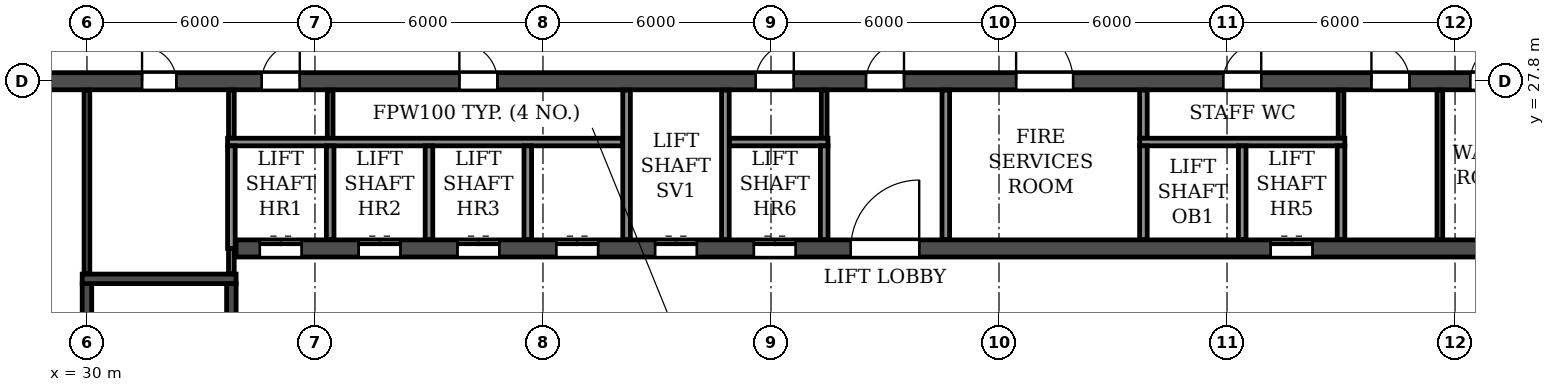
"""IFC4 building model, lengths in metres.
Left out: names, types, materials, properties, quantities, classifications, styles, units other than length and angle.
Written with IfcOpenShell. Run it as: python <this file> out.ifc"""

import sys

from ifc_helpers import new_model, si_unit, direction, frame, frame_2d, origin, place, context, subcontext, project, spatial, rectangle, extrude, element, fill, save


model = new_model("IFC4")
c1 = context("Model", 3, precision=1e-05, world=origin(), true_north=direction((0.0, 1.0)))
c2 = subcontext(c1, "Body", "Model", "MODEL_VIEW")
j1 = project(units=[si_unit("LENGTHUNIT", "METRE"), si_unit("PLANEANGLEUNIT", "RADIAN")], contexts=[c1])
p1 = place(None, origin())
s1 = spatial("IfcSite", under=j1, at=p1, CompositionType="ELEMENT")
p2 = place(p1, origin())
s2 = spatial("IfcBuilding", under=s1, at=p2, CompositionType="ELEMENT")
p3 = place(p2, frame((0.0, 0.0, 152.1)))
s3 = spatial("IfcBuildingStorey", under=s2, at=p3, CompositionType="ELEMENT", Elevation=152.1)
p4 = place(p3, frame((12.2, 27.8, 0.0), z_axis=(0.0, 0.0, 1.0), x_axis=(1.0, 0.0, 0.0)))
e1 = element("IfcWall", 1, at=p4, inside=s3, PredefinedType="SOLIDWALL", context=c2, shape_type="SweptSolid", body=[
    extrude(rectangle(XDim=77.6, YDim=0.45, at=frame_2d((38.8, 0.0))), origin(), (0.0, 0.0, 1.0), 3.07),
])
p5 = place(p4, frame((2.3, 0.0, 0.0)))
e2 = element("IfcOpeningElement", 2, at=p5, cuts=e1, PredefinedType="OPENING", context=c2, shape_type="SweptSolid", body=[
    extrude(rectangle(XDim=1.0, YDim=2.1, at=frame_2d((0.5, 1.05))), frame((0.0, 0.235, 0.0), z_axis=(0.0, -1.0, 0.0), x_axis=(1.0, 0.0, 0.0)), (0.0, 0.0, 1.0), 0.47),
])
p6 = place(p4, frame((6.7, 0.0, 0.0)))
e3 = element("IfcOpeningElement", 3, at=p6, cuts=e1, PredefinedType="OPENING", context=c2, shape_type="SweptSolid", body=[
    extrude(rectangle(XDim=1.0, YDim=2.1, at=frame_2d((0.5, 1.05))), frame((0.0, 0.235, 0.0), z_axis=(0.0, -1.0, 0.0), x_axis=(1.0, 0.0, 0.0)), (0.0, 0.0, 1.0), 0.47),
])
p7 = place(p4, frame((10.05, 0.0, 0.0)))
e4 = element("IfcOpeningElement", 4, at=p7, cuts=e1, PredefinedType="OPENING", context=c2, shape_type="SweptSolid", body=[
    extrude(rectangle(XDim=0.9, YDim=2.1, at=frame_2d((0.45, 1.05))), frame((0.0, 0.235, 0.0), z_axis=(0.0, -1.0, 0.0), x_axis=(1.0, 0.0, 0.0)), (0.0, 0.0, 1.0), 0.47),
])
p8 = place(p4, frame((19.25, 0.0, 0.0)))
e5 = element("IfcOpeningElement", 5, at=p8, cuts=e1, PredefinedType="OPENING", context=c2, shape_type="SweptSolid", body=[
    extrude(rectangle(XDim=0.9, YDim=2.1, at=frame_2d((0.45, 1.05))), frame((0.0, 0.235, 0.0), z_axis=(0.0, -1.0, 0.0), x_axis=(1.0, 0.0, 0.0)), (0.0, 0.0, 1.0), 0.47),
])
p9 = place(p4, frame((22.4, 0.0, 0.0)))
e6 = element("IfcOpeningElement", 6, at=p9, cuts=e1, PredefinedType="OPENING", context=c2, shape_type="SweptSolid", body=[
    extrude(rectangle(XDim=1.0, YDim=2.1, at=frame_2d((0.5, 1.05))), frame((0.0, 0.235, 0.0), z_axis=(0.0, -1.0, 0.0), x_axis=(1.0, 0.0, 0.0)), (0.0, 0.0, 1.0), 0.47),
])
p10 = place(p4, frame((27.6, 0.0, 0.0)))
e7 = element("IfcOpeningElement", 7, at=p10, cuts=e1, PredefinedType="OPENING", context=c2, shape_type="SweptSolid", body=[
    extrude(rectangle(XDim=1.0, YDim=2.1, at=frame_2d((0.5, 1.05))), frame((0.0, 0.235, 0.0), z_axis=(0.0, -1.0, 0.0), x_axis=(1.0, 0.0, 0.0)), (0.0, 0.0, 1.0), 0.47),
])
p11 = place(p4, frame((35.4, 0.0, 0.0)))
e8 = element("IfcOpeningElement", 8, at=p11, cuts=e1, PredefinedType="OPENING", context=c2, shape_type="SweptSolid", body=[
    extrude(rectangle(XDim=1.0, YDim=2.1, at=frame_2d((0.5, 1.05))), frame((0.0, 0.235, 0.0), z_axis=(0.0, -1.0, 0.0), x_axis=(1.0, 0.0, 0.0)), (0.0, 0.0, 1.0), 0.47),
])
p12 = place(p4, frame((38.3, 0.0, 0.0)))
e9 = element("IfcOpeningElement", 9, at=p12, cuts=e1, PredefinedType="OPENING", context=c2, shape_type="SweptSolid", body=[
    extrude(rectangle(XDim=1.0, YDim=2.1, at=frame_2d((0.5, 1.05))), frame((0.0, 0.235, 0.0), z_axis=(0.0, -1.0, 0.0), x_axis=(1.0, 0.0, 0.0)), (0.0, 0.0, 1.0), 0.47),
])
p13 = place(p4, frame((42.25, 0.0, 0.0)))
e10 = element("IfcOpeningElement", 10, at=p13, cuts=e1, PredefinedType="OPENING", context=c2, shape_type="SweptSolid", body=[
    extrude(rectangle(XDim=1.5, YDim=2.1, at=frame_2d((0.75, 1.05))), frame((0.0, 0.235, 0.0), z_axis=(0.0, -1.0, 0.0), x_axis=(1.0, 0.0, 0.0)), (0.0, 0.0, 1.0), 0.47),
])
p14 = place(p4, frame((47.7, 0.0, 0.0)))
e11 = element("IfcOpeningElement", 11, at=p14, cuts=e1, PredefinedType="OPENING", context=c2, shape_type="SweptSolid", body=[
    extrude(rectangle(XDim=1.0, YDim=2.1, at=frame_2d((0.5, 1.05))), frame((0.0, 0.235, 0.0), z_axis=(0.0, -1.0, 0.0), x_axis=(1.0, 0.0, 0.0)), (0.0, 0.0, 1.0), 0.47),
])
p15 = place(p4, frame((51.6, 0.0, 0.0)))
e12 = element("IfcOpeningElement", 12, at=p15, cuts=e1, PredefinedType="OPENING", context=c2, shape_type="SweptSolid", body=[
    extrude(rectangle(XDim=1.0, YDim=2.1, at=frame_2d((0.5, 1.05))), frame((0.0, 0.235, 0.0), z_axis=(0.0, -1.0, 0.0), x_axis=(1.0, 0.0, 0.0)), (0.0, 0.0, 1.0), 0.47),
])
p16 = place(p4, frame((54.2, 0.0, 0.0)))
e13 = element("IfcOpeningElement", 13, at=p16, cuts=e1, PredefinedType="OPENING", context=c2, shape_type="SweptSolid", body=[
    extrude(rectangle(XDim=1.0, YDim=2.1, at=frame_2d((0.5, 1.05))), frame((0.0, 0.235, 0.0), z_axis=(0.0, -1.0, 0.0), x_axis=(1.0, 0.0, 0.0)), (0.0, 0.0, 1.0), 0.47),
])
p17 = place(p4, frame((57.45, 0.0, 0.0)))
e14 = element("IfcOpeningElement", 14, at=p17, cuts=e1, PredefinedType="OPENING", context=c2, shape_type="SweptSolid", body=[
    extrude(rectangle(XDim=0.9, YDim=2.1, at=frame_2d((0.45, 1.05))), frame((0.0, 0.235, 0.0), z_axis=(0.0, -1.0, 0.0), x_axis=(1.0, 0.0, 0.0)), (0.0, 0.0, 1.0), 0.47),
])
p18 = place(p4, frame((66.65, 0.0, 0.0)))
e15 = element("IfcOpeningElement", 15, at=p18, cuts=e1, PredefinedType="OPENING", context=c2, shape_type="SweptSolid", body=[
    extrude(rectangle(XDim=0.9, YDim=2.1, at=frame_2d((0.45, 1.05))), frame((0.0, 0.235, 0.0), z_axis=(0.0, -1.0, 0.0), x_axis=(1.0, 0.0, 0.0)), (0.0, 0.0, 1.0), 0.47),
])
p19 = place(p4, frame((69.9, 0.0, 0.0)))
e16 = element("IfcOpeningElement", 16, at=p19, cuts=e1, PredefinedType="OPENING", context=c2, shape_type="SweptSolid", body=[
    extrude(rectangle(XDim=1.0, YDim=2.1, at=frame_2d((0.5, 1.05))), frame((0.0, 0.235, 0.0), z_axis=(0.0, -1.0, 0.0), x_axis=(1.0, 0.0, 0.0)), (0.0, 0.0, 1.0), 0.47),
])
p20 = place(p4, frame((74.3, 0.0, 0.0)))
e17 = element("IfcOpeningElement", 17, at=p20, cuts=e1, PredefinedType="OPENING", context=c2, shape_type="SweptSolid", body=[
    extrude(rectangle(XDim=1.0, YDim=2.1, at=frame_2d((0.5, 1.05))), frame((0.0, 0.235, 0.0), z_axis=(0.0, -1.0, 0.0), x_axis=(1.0, 0.0, 0.0)), (0.0, 0.0, 1.0), 0.47),
])
p21 = place(p3, frame((33.925, 23.4, 0.0), z_axis=(0.0, 0.0, 1.0), x_axis=(1.0, 0.0, 0.0)))
e18 = element("IfcWall", 18, at=p21, inside=s3, PredefinedType="SOLIDWALL", context=c2, shape_type="SweptSolid", body=[
    extrude(rectangle(XDim=34.15, YDim=0.45, at=frame_2d((17.075, 0.0))), origin(), (0.0, 0.0, 1.0), 3.07),
])
p22 = place(p21, frame((16.175, 0.0, 0.0)))
e19 = element("IfcOpeningElement", 19, at=p22, cuts=e18, PredefinedType="OPENING", context=c2, shape_type="SweptSolid", body=[
    extrude(rectangle(XDim=1.8, YDim=2.1, at=frame_2d((0.9, 1.05))), frame((0.0, 0.235, 0.0), z_axis=(0.0, -1.0, 0.0), x_axis=(1.0, 0.0, 0.0)), (0.0, 0.0, 1.0), 0.47),
])
p23 = place(p21, frame((0.625, 0.0, 0.0)))
e20 = element("IfcOpeningElement", 20, at=p23, cuts=e18, PredefinedType="OPENING", context=c2, shape_type="SweptSolid", body=[
    extrude(rectangle(XDim=1.1, YDim=2.1, at=frame_2d((0.55, 1.05))), frame((0.0, 0.235, 0.0), z_axis=(0.0, -1.0, 0.0), x_axis=(1.0, 0.0, 0.0)), (0.0, 0.0, 1.0), 0.47),
])
p24 = place(p21, frame((3.225, 0.0, 0.0)))
e21 = element("IfcOpeningElement", 21, at=p24, cuts=e18, PredefinedType="OPENING", context=c2, shape_type="SweptSolid", body=[
    extrude(rectangle(XDim=1.1, YDim=2.1, at=frame_2d((0.55, 1.05))), frame((0.0, 0.235, 0.0), z_axis=(0.0, -1.0, 0.0), x_axis=(1.0, 0.0, 0.0)), (0.0, 0.0, 1.0), 0.47),
])
p25 = place(p21, frame((5.825, 0.0, 0.0)))
e22 = element("IfcOpeningElement", 22, at=p25, cuts=e18, PredefinedType="OPENING", context=c2, shape_type="SweptSolid", body=[
    extrude(rectangle(XDim=1.1, YDim=2.1, at=frame_2d((0.55, 1.05))), frame((0.0, 0.235, 0.0), z_axis=(0.0, -1.0, 0.0), x_axis=(1.0, 0.0, 0.0)), (0.0, 0.0, 1.0), 0.47),
])
p26 = place(p21, frame((8.425, 0.0, 0.0)))
e23 = element("IfcOpeningElement", 23, at=p26, cuts=e18, PredefinedType="OPENING", context=c2, shape_type="SweptSolid", body=[
    extrude(rectangle(XDim=1.1, YDim=2.1, at=frame_2d((0.55, 1.05))), frame((0.0, 0.235, 0.0), z_axis=(0.0, -1.0, 0.0), x_axis=(1.0, 0.0, 0.0)), (0.0, 0.0, 1.0), 0.47),
])
p27 = place(p21, frame((11.025, 0.0, 0.0)))
e24 = element("IfcOpeningElement", 24, at=p27, cuts=e18, PredefinedType="OPENING", context=c2, shape_type="SweptSolid", body=[
    extrude(rectangle(XDim=1.1, YDim=2.1, at=frame_2d((0.55, 1.05))), frame((0.0, 0.235, 0.0), z_axis=(0.0, -1.0, 0.0), x_axis=(1.0, 0.0, 0.0)), (0.0, 0.0, 1.0), 0.47),
])
p28 = place(p21, frame((13.625, 0.0, 0.0)))
e25 = element("IfcOpeningElement", 25, at=p28, cuts=e18, PredefinedType="OPENING", context=c2, shape_type="SweptSolid", body=[
    extrude(rectangle(XDim=1.1, YDim=2.1, at=frame_2d((0.55, 1.05))), frame((0.0, 0.235, 0.0), z_axis=(0.0, -1.0, 0.0), x_axis=(1.0, 0.0, 0.0)), (0.0, 0.0, 1.0), 0.47),
])
p29 = place(p21, frame((27.225, 0.0, 0.0)))
e26 = element("IfcOpeningElement", 26, at=p29, cuts=e18, PredefinedType="OPENING", context=c2, shape_type="SweptSolid", body=[
    extrude(rectangle(XDim=1.1, YDim=2.1, at=frame_2d((0.55, 1.05))), frame((0.0, 0.235, 0.0), z_axis=(0.0, -1.0, 0.0), x_axis=(1.0, 0.0, 0.0)), (0.0, 0.0, 1.0), 0.47),
])
p30 = place(p3, frame((30.0, 14.825, 0.0), z_axis=(0.0, 0.0, 1.0), x_axis=(0.0, 1.0, 0.0)))
e27 = element("IfcWall", 27, at=p30, inside=s3, PredefinedType="SOLIDWALL", context=c2, shape_type="SweptSolid", body=[
    extrude(rectangle(XDim=7.65, YDim=0.25, at=frame_2d((3.825, 0.0))), origin(), (0.0, 0.0, 1.0), 3.07),
])
p31 = place(p3, frame((33.8, 14.825, 0.0), z_axis=(0.0, 0.0, 1.0), x_axis=(0.0, 1.0, 0.0)))
e28 = element("IfcWall", 28, at=p31, inside=s3, PredefinedType="SOLIDWALL", context=c2, shape_type="SweptSolid", body=[
    extrude(rectangle(XDim=7.65, YDim=0.25, at=frame_2d((3.825, 0.0))), origin(), (0.0, 0.0, 1.0), 3.07),
])
p32 = place(p31, frame((0.475, 0.0, 0.0)))
e29 = element("IfcOpeningElement", 29, at=p32, cuts=e28, PredefinedType="OPENING", context=c2, shape_type="SweptSolid", body=[
    extrude(rectangle(XDim=1.0, YDim=2.1, at=frame_2d((0.5, 1.05))), frame((0.0, 0.135, 0.0), z_axis=(0.0, -1.0, 0.0), x_axis=(1.0, 0.0, 0.0)), (0.0, 0.0, 1.0), 0.27),
])
p33 = place(p3, frame((29.875, 22.6, 0.0), z_axis=(0.0, 0.0, 1.0), x_axis=(1.0, 0.0, 0.0)))
e30 = element("IfcWall", 30, at=p33, inside=s3, PredefinedType="SOLIDWALL", context=c2, shape_type="SweptSolid", body=[
    extrude(rectangle(XDim=4.05, YDim=0.25, at=frame_2d((2.025, 0.0))), origin(), (0.0, 0.0, 1.0), 3.07),
])
for number, where, z_axis, x_axis in (
    (31, (49.4, 26.3, 0.0), (0.0, 0.0, 1.0), (0.0, 1.0, 0.0)),
    (32, (36.4, 26.3, 0.0), (0.0, 0.0, 1.0), (0.0, 1.0, 0.0)),
    (33, (63.0, 26.3, 0.0), (0.0, 0.0, 1.0), (0.0, 1.0, 0.0)),
):
    element("IfcWall", number, at=place(p3, frame(where, z_axis=z_axis, x_axis=x_axis)), inside=s3, PredefinedType="PARTITIONING", context=c2, shape_type="SweptSolid", body=[
        extrude(rectangle(XDim=1.265, YDim=0.15, at=frame_2d((0.632, 0.0))), origin(), (0.0, 0.0, 1.0), 3.07),
    ])
p34 = place(p3, frame((65.6, 23.635, 0.0), z_axis=(0.0, 0.0, 1.0), x_axis=(0.0, 1.0, 0.0)))
e34 = element("IfcWall", 34, at=p34, inside=s3, PredefinedType="PARTITIONING", context=c2, shape_type="SweptSolid", body=[
    extrude(rectangle(XDim=3.93, YDim=0.15, at=frame_2d((1.965, 0.0))), origin(), (0.0, 0.0, 1.0), 3.07),
])
p35 = place(p3, frame((52.6, 23.635, 0.0), z_axis=(0.0, 0.0, 1.0), x_axis=(0.0, 1.0, 0.0)))
e35 = element("IfcWall", 35, at=p35, inside=s3, PredefinedType="PARTITIONING", context=c2, shape_type="SweptSolid", body=[
    extrude(rectangle(XDim=3.93, YDim=0.2, at=frame_2d((1.965, 0.0))), origin(), (0.0, 0.0, 1.0), 3.07),
])
p36 = place(p3, frame((57.8, 26.3, 0.0), z_axis=(0.0, 0.0, 1.0), x_axis=(0.0, 1.0, 0.0)))
e36 = element("IfcWall", 36, at=p36, inside=s3, PredefinedType="PARTITIONING", context=c2, shape_type="SweptSolid", body=[
    extrude(rectangle(XDim=1.265, YDim=0.2, at=frame_2d((0.632, 0.0))), origin(), (0.0, 0.0, 1.0), 3.07),
])
p37 = place(p3, frame((30.0, 22.735, 0.0), z_axis=(0.0, 0.0, 1.0), x_axis=(0.0, 1.0, 0.0)))
e37 = element("IfcWall", 37, at=p37, inside=s3, PredefinedType="PARTITIONING", context=c2, shape_type="SweptSolid", body=[
    extrude(rectangle(XDim=4.83, YDim=0.15, at=frame_2d((2.415, 0.0))), origin(), (0.0, 0.0, 1.0), 3.07),
])
p38 = place(p3, frame((33.8, 22.735, 0.0), z_axis=(0.0, 0.0, 1.0), x_axis=(0.0, 1.0, 0.0)))
e38 = element("IfcWall", 38, at=p38, inside=s3, PredefinedType="PARTITIONING", context=c2, shape_type="SweptSolid", body=[
    extrude(rectangle(XDim=0.665, YDim=0.15, at=frame_2d((0.333, 0.0))), origin(), (0.0, 0.0, 1.0), 3.07),
])
p39 = place(p3, frame((33.8, 26.3, 0.0), z_axis=(0.0, 0.0, 1.0), x_axis=(0.0, 1.0, 0.0)))
e39 = element("IfcWall", 39, at=p39, inside=s3, PredefinedType="PARTITIONING", context=c2, shape_type="SweptSolid", body=[
    extrude(rectangle(XDim=1.265, YDim=0.15, at=frame_2d((0.632, 0.0))), origin(), (0.0, 0.0, 1.0), 3.07),
])
p40 = place(p3, frame((33.7, 26.2, 0.0), z_axis=(0.0, 0.0, 1.0), x_axis=(1.0, 0.0, 0.0)))
e40 = element("IfcWall", 40, at=p40, inside=s3, PredefinedType="PARTITIONING", context=c2, shape_type="SweptSolid", body=[
    extrude(rectangle(XDim=10.4, YDim=0.2, at=frame_2d((5.2, 0.0))), origin(), (0.0, 0.0, 1.0), 3.07),
])
p41 = place(p3, frame((46.9, 26.2, 0.0), z_axis=(0.0, 0.0, 1.0), x_axis=(1.0, 0.0, 0.0)))
e41 = element("IfcWall", 41, at=p41, inside=s3, PredefinedType="PARTITIONING", context=c2, shape_type="SweptSolid", body=[
    extrude(rectangle(XDim=2.6, YDim=0.2, at=frame_2d((1.3, 0.0))), origin(), (0.0, 0.0, 1.0), 3.07),
])
p42 = place(p3, frame((57.7, 26.2, 0.0), z_axis=(0.0, 0.0, 1.0), x_axis=(1.0, 0.0, 0.0)))
e42 = element("IfcWall", 42, at=p42, inside=s3, PredefinedType="PARTITIONING", context=c2, shape_type="SweptSolid", body=[
    extrude(rectangle(XDim=5.4, YDim=0.2, at=frame_2d((2.7, 0.0))), origin(), (0.0, 0.0, 1.0), 3.07),
])
p43 = place(p3, frame((33.8, 23.4, 0.0), z_axis=(0.0, 0.0, 1.0), x_axis=(0.0, 1.0, 0.0)))
e43 = element("IfcWall", 43, at=p43, inside=s3, PredefinedType="PARTITIONING", context=c2, shape_type="SweptSolid", body=[
    extrude(rectangle(XDim=2.7, YDim=0.2, at=frame_2d((1.35, 0.0))), origin(), (0.0, 0.0, 1.0), 3.07),
])
for number, where, z_axis, x_axis in (
    (44, (36.4, 23.635, 0.0), (0.0, 0.0, 1.0), (0.0, 1.0, 0.0)),
    (45, (39.0, 23.635, 0.0), (0.0, 0.0, 1.0), (0.0, 1.0, 0.0)),
    (46, (41.6, 23.635, 0.0), (0.0, 0.0, 1.0), (0.0, 1.0, 0.0)),
):
    element("IfcWall", number, at=place(p3, frame(where, z_axis=z_axis, x_axis=x_axis)), inside=s3, PredefinedType="PARTITIONING", context=c2, shape_type="SweptSolid", body=[
        extrude(rectangle(XDim=2.465, YDim=0.2, at=frame_2d((1.232, 0.0))), origin(), (0.0, 0.0, 1.0), 3.07),
    ])
for number, where, z_axis, x_axis in (
    (47, (44.2, 23.635, 0.0), (0.0, 0.0, 1.0), (0.0, 1.0, 0.0)),
    (48, (46.8, 23.635, 0.0), (0.0, 0.0, 1.0), (0.0, 1.0, 0.0)),
):
    element("IfcWall", number, at=place(p3, frame(where, z_axis=z_axis, x_axis=x_axis)), inside=s3, PredefinedType="PARTITIONING", context=c2, shape_type="SweptSolid", body=[
        extrude(rectangle(XDim=3.93, YDim=0.2, at=frame_2d((1.965, 0.0))), origin(), (0.0, 0.0, 1.0), 3.07),
    ])
for number, where, z_axis, x_axis in (
    (49, (49.4, 23.635, 0.0), (0.0, 0.0, 1.0), (0.0, 1.0, 0.0)),
    (50, (57.8, 23.635, 0.0), (0.0, 0.0, 1.0), (0.0, 1.0, 0.0)),
    (51, (60.4, 23.635, 0.0), (0.0, 0.0, 1.0), (0.0, 1.0, 0.0)),
    (52, (63.0, 23.635, 0.0), (0.0, 0.0, 1.0), (0.0, 1.0, 0.0)),
):
    element("IfcWall", number, at=place(p3, frame(where, z_axis=z_axis, x_axis=x_axis)), inside=s3, PredefinedType="PARTITIONING", context=c2, shape_type="SweptSolid", body=[
        extrude(rectangle(XDim=2.465, YDim=0.2, at=frame_2d((1.232, 0.0))), origin(), (0.0, 0.0, 1.0), 3.07),
    ])
p44 = place(p8, origin())
e53 = element("IfcDoor", 53, at=p44, inside=s3, OperationType="SINGLE_SWING_LEFT", PredefinedType="DOOR", context=c2, shape_type="SweptSolid", body=[
    extrude(rectangle(XDim=0.9, YDim=2.1, at=frame_2d((0.45, 1.05))), frame((0.0, 0.025, 0.0), z_axis=(0.0, -1.0, 0.0), x_axis=(1.0, 0.0, 0.0)), (0.0, 0.0, 1.0), 0.05),
])
fill(e5, e53)
p45 = place(p9, origin())
e54 = element("IfcDoor", 54, at=p45, inside=s3, OperationType="SINGLE_SWING_RIGHT", PredefinedType="DOOR", context=c2, shape_type="SweptSolid", body=[
    extrude(rectangle(XDim=1.0, YDim=2.1, at=frame_2d((0.5, 1.05))), frame((0.0, 0.025, 0.0), z_axis=(0.0, -1.0, 0.0), x_axis=(1.0, 0.0, 0.0)), (0.0, 0.0, 1.0), 0.05),
])
fill(e6, e54)
p46 = place(p10, origin())
e55 = element("IfcDoor", 55, at=p46, inside=s3, OperationType="SINGLE_SWING_LEFT", PredefinedType="DOOR", context=c2, shape_type="SweptSolid", body=[
    extrude(rectangle(XDim=1.0, YDim=2.1, at=frame_2d((0.5, 1.05))), frame((0.0, 0.025, 0.0), z_axis=(0.0, -1.0, 0.0), x_axis=(1.0, 0.0, 0.0)), (0.0, 0.0, 1.0), 0.05),
])
fill(e7, e55)
p47 = place(p11, origin())
e56 = element("IfcDoor", 56, at=p47, inside=s3, OperationType="SINGLE_SWING_RIGHT", PredefinedType="DOOR", context=c2, shape_type="SweptSolid", body=[
    extrude(rectangle(XDim=1.0, YDim=2.1, at=frame_2d((0.5, 1.05))), frame((0.0, 0.025, 0.0), z_axis=(0.0, -1.0, 0.0), x_axis=(1.0, 0.0, 0.0)), (0.0, 0.0, 1.0), 0.05),
])
fill(e8, e56)
p48 = place(p12, origin())
e57 = element("IfcDoor", 57, at=p48, inside=s3, OperationType="SINGLE_SWING_RIGHT", PredefinedType="DOOR", context=c2, shape_type="SweptSolid", body=[
    extrude(rectangle(XDim=1.0, YDim=2.1, at=frame_2d((0.5, 1.05))), frame((0.0, 0.025, 0.0), z_axis=(0.0, -1.0, 0.0), x_axis=(1.0, 0.0, 0.0)), (0.0, 0.0, 1.0), 0.05),
])
fill(e9, e57)
p49 = place(p13, origin())
e58 = element("IfcDoor", 58, at=p49, inside=s3, OperationType="DOUBLE_DOOR_SINGLE_SWING", PredefinedType="DOOR", context=c2, shape_type="SweptSolid", body=[
    extrude(rectangle(XDim=1.5, YDim=2.1, at=frame_2d((0.75, 1.05))), frame((0.0, 0.025, 0.0), z_axis=(0.0, -1.0, 0.0), x_axis=(1.0, 0.0, 0.0)), (0.0, 0.0, 1.0), 0.05),
])
fill(e10, e58)
p50 = place(p14, origin())
e59 = element("IfcDoor", 59, at=p50, inside=s3, OperationType="SINGLE_SWING_RIGHT", PredefinedType="DOOR", context=c2, shape_type="SweptSolid", body=[
    extrude(rectangle(XDim=1.0, YDim=2.1, at=frame_2d((0.5, 1.05))), frame((0.0, 0.025, 0.0), z_axis=(0.0, -1.0, 0.0), x_axis=(1.0, 0.0, 0.0)), (0.0, 0.0, 1.0), 0.05),
])
fill(e11, e59)
p51 = place(p15, origin())
e60 = element("IfcDoor", 60, at=p51, inside=s3, OperationType="SINGLE_SWING_LEFT", PredefinedType="DOOR", context=c2, shape_type="SweptSolid", body=[
    extrude(rectangle(XDim=1.0, YDim=2.1, at=frame_2d((0.5, 1.05))), frame((0.0, 0.025, 0.0), z_axis=(0.0, -1.0, 0.0), x_axis=(1.0, 0.0, 0.0)), (0.0, 0.0, 1.0), 0.05),
])
fill(e12, e60)
p52 = place(p16, origin())
e61 = element("IfcDoor", 61, at=p52, inside=s3, OperationType="SINGLE_SWING_RIGHT", PredefinedType="DOOR", context=c2, shape_type="SweptSolid", body=[
    extrude(rectangle(XDim=1.0, YDim=2.1, at=frame_2d((0.5, 1.05))), frame((0.0, 0.025, 0.0), z_axis=(0.0, -1.0, 0.0), x_axis=(1.0, 0.0, 0.0)), (0.0, 0.0, 1.0), 0.05),
])
fill(e13, e61)
p53 = place(p22, origin())
e62 = element("IfcDoor", 62, at=p53, inside=s3, OperationType="DOUBLE_DOOR_SINGLE_SWING", PredefinedType="DOOR", context=c2, shape_type="SweptSolid", body=[
    extrude(rectangle(XDim=1.8, YDim=2.1, at=frame_2d((0.9, 1.05))), frame((0.0, 0.025, 0.0), z_axis=(0.0, -1.0, 0.0), x_axis=(1.0, 0.0, 0.0)), (0.0, 0.0, 1.0), 0.05),
])
fill(e19, e62)
p54 = place(p23, origin())
e63 = element("IfcDoor", 63, at=p54, inside=s3, OperationType="DOUBLE_DOOR_SLIDING", PredefinedType="DOOR", context=c2, shape_type="SweptSolid", body=[
    extrude(rectangle(XDim=1.1, YDim=2.1, at=frame_2d((0.55, 1.05))), frame((0.0, 0.025, 0.0), z_axis=(0.0, -1.0, 0.0), x_axis=(1.0, 0.0, 0.0)), (0.0, 0.0, 1.0), 0.05),
])
fill(e20, e63)
p55 = place(p24, origin())
e64 = element("IfcDoor", 64, at=p55, inside=s3, OperationType="DOUBLE_DOOR_SLIDING", PredefinedType="DOOR", context=c2, shape_type="SweptSolid", body=[
    extrude(rectangle(XDim=1.1, YDim=2.1, at=frame_2d((0.55, 1.05))), frame((0.0, 0.025, 0.0), z_axis=(0.0, -1.0, 0.0), x_axis=(1.0, 0.0, 0.0)), (0.0, 0.0, 1.0), 0.05),
])
fill(e21, e64)
p56 = place(p25, origin())
e65 = element("IfcDoor", 65, at=p56, inside=s3, OperationType="DOUBLE_DOOR_SLIDING", PredefinedType="DOOR", context=c2, shape_type="SweptSolid", body=[
    extrude(rectangle(XDim=1.1, YDim=2.1, at=frame_2d((0.55, 1.05))), frame((0.0, 0.025, 0.0), z_axis=(0.0, -1.0, 0.0), x_axis=(1.0, 0.0, 0.0)), (0.0, 0.0, 1.0), 0.05),
])
fill(e22, e65)
p57 = place(p26, origin())
e66 = element("IfcDoor", 66, at=p57, inside=s3, OperationType="DOUBLE_DOOR_SLIDING", PredefinedType="DOOR", context=c2, shape_type="SweptSolid", body=[
    extrude(rectangle(XDim=1.1, YDim=2.1, at=frame_2d((0.55, 1.05))), frame((0.0, 0.025, 0.0), z_axis=(0.0, -1.0, 0.0), x_axis=(1.0, 0.0, 0.0)), (0.0, 0.0, 1.0), 0.05),
])
fill(e23, e66)
p58 = place(p27, origin())
e67 = element("IfcDoor", 67, at=p58, inside=s3, OperationType="DOUBLE_DOOR_SLIDING", PredefinedType="DOOR", context=c2, shape_type="SweptSolid", body=[
    extrude(rectangle(XDim=1.1, YDim=2.1, at=frame_2d((0.55, 1.05))), frame((0.0, 0.025, 0.0), z_axis=(0.0, -1.0, 0.0), x_axis=(1.0, 0.0, 0.0)), (0.0, 0.0, 1.0), 0.05),
])
fill(e24, e67)
p59 = place(p28, origin())
e68 = element("IfcDoor", 68, at=p59, inside=s3, OperationType="DOUBLE_DOOR_SLIDING", PredefinedType="DOOR", context=c2, shape_type="SweptSolid", body=[
    extrude(rectangle(XDim=1.1, YDim=2.1, at=frame_2d((0.55, 1.05))), frame((0.0, 0.025, 0.0), z_axis=(0.0, -1.0, 0.0), x_axis=(1.0, 0.0, 0.0)), (0.0, 0.0, 1.0), 0.05),
])
fill(e25, e68)
p60 = place(p29, origin())
e69 = element("IfcDoor", 69, at=p60, inside=s3, OperationType="DOUBLE_DOOR_SLIDING", PredefinedType="DOOR", context=c2, shape_type="SweptSolid", body=[
    extrude(rectangle(XDim=1.1, YDim=2.1, at=frame_2d((0.55, 1.05))), frame((0.0, 0.025, 0.0), z_axis=(0.0, -1.0, 0.0), x_axis=(1.0, 0.0, 0.0)), (0.0, 0.0, 1.0), 0.05),
])
fill(e26, e69)
save(model, sys.argv[1])
